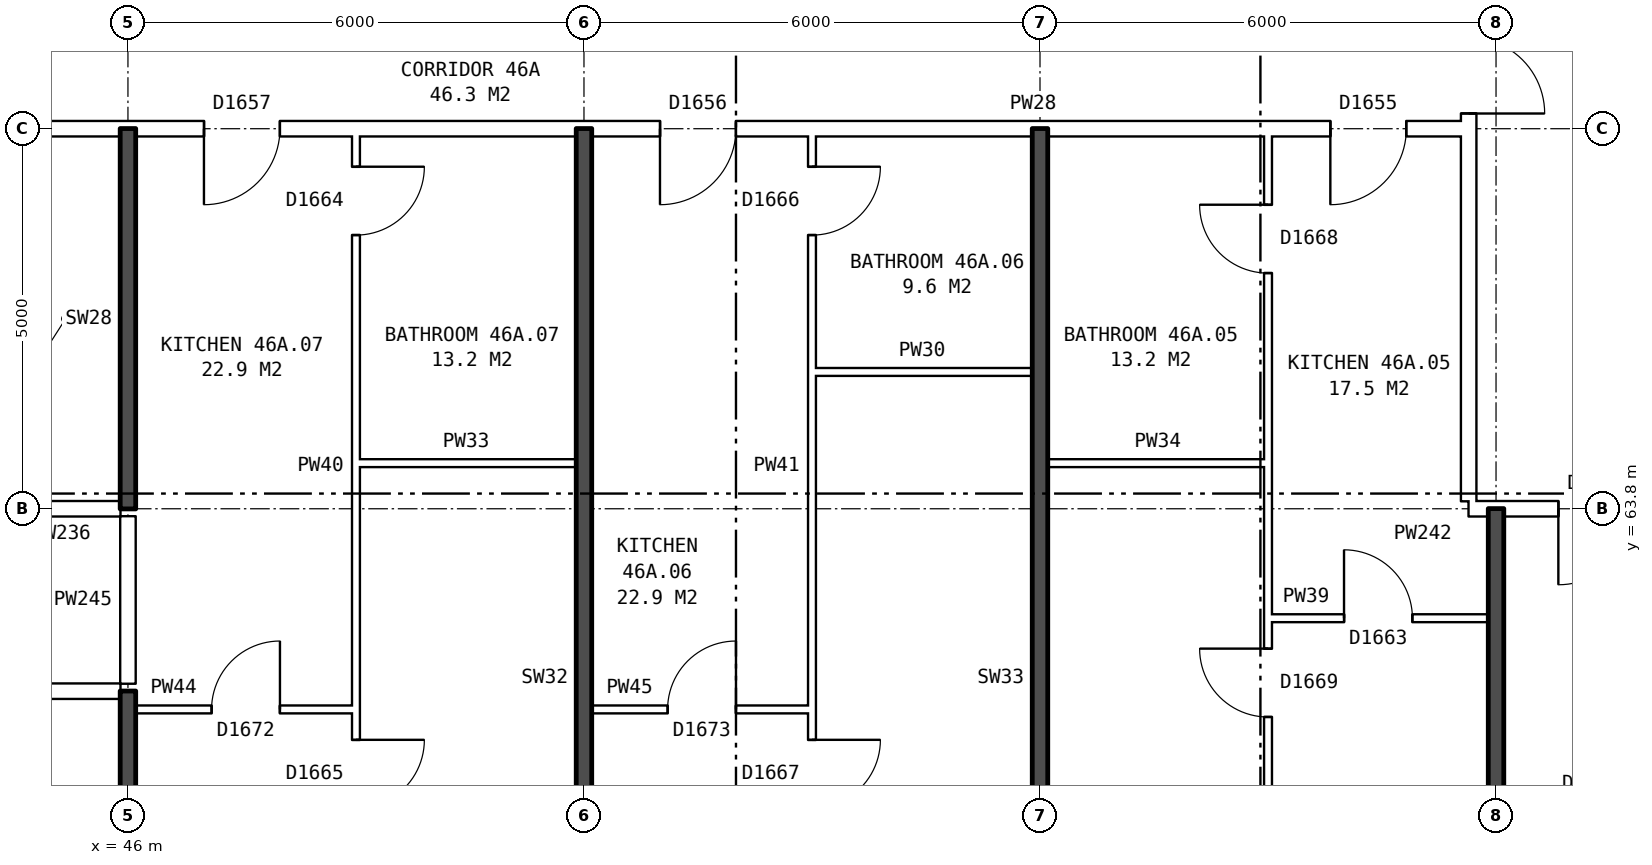
"""IFC4 building model, lengths in metres.
Left out: names, types, materials, properties, quantities, classifications, styles, units other than length and angle.
Written with IfcOpenShell. Run it as: python <this file> out.ifc"""

import sys

from ifc_helpers import new_model, si_unit, direction, frame, frame_2d, origin, place, context, subcontext, project, spatial, rectangle, extrude, element, fill, save


model = new_model("IFC4")
c1 = context("Model", 3, precision=1e-05, world=origin(), true_north=direction((0.0, 1.0)))
c2 = subcontext(c1, "Body", "Model", "MODEL_VIEW")
j1 = project(units=[si_unit("LENGTHUNIT", "METRE"), si_unit("PLANEANGLEUNIT", "RADIAN")], contexts=[c1])
p1 = place(None, origin())
s1 = spatial("IfcSite", under=j1, at=p1, CompositionType="ELEMENT")
p2 = place(p1, origin())
s2 = spatial("IfcBuilding", under=s1, at=p2, CompositionType="ELEMENT")
p3 = place(p2, frame((0.0, 0.0, 164.0)))
s3 = spatial("IfcBuildingStorey", under=s2, at=p3, CompositionType="ELEMENT", Elevation=164.0)
p4 = place(p3, frame((63.64, 63.9, 0.0), z_axis=(0.0, 0.0, 1.0), x_axis=(0.0, 1.0, 0.0)))
e1 = element("IfcWall", 1, at=p4, inside=s3, PredefinedType="PARTITIONING", context=c2, shape_type="SweptSolid", body=[
    extrude(rectangle(XDim=12.2, YDim=0.2, at=frame_2d((6.1, 0.0))), origin(), (0.0, 0.0, 1.0), 2.85),
])
p5 = place(p4, frame((5.1, 0.0, 0.0)))
e2 = element("IfcOpeningElement", 2, at=p5, cuts=e1, PredefinedType="OPENING", context=c2, shape_type="SweptSolid", body=[
    extrude(rectangle(XDim=2.0, YDim=2.1, at=frame_2d((1.0, 1.05))), frame((0.0, 0.11, 0.0), z_axis=(0.0, -1.0, 0.0), x_axis=(1.0, 0.0, 0.0)), (0.0, 0.0, 1.0), 0.22),
])
p6 = place(p3, frame((46.1, 61.16, 0.0), z_axis=(0.0, 0.0, 1.0), x_axis=(1.0, 0.0, 0.0)))
e3 = element("IfcWall", 3, at=p6, inside=s3, PredefinedType="PARTITIONING", context=c2, shape_type="SweptSolid", body=[
    extrude(rectangle(XDim=2.9, YDim=0.1, at=frame_2d((1.45, 0.0))), origin(), (0.0, 0.0, 1.0), 2.85),
])
p7 = place(p6, frame((1.0, 0.0, 0.0)))
e4 = element("IfcOpeningElement", 4, at=p7, cuts=e3, PredefinedType="OPENING", context=c2, shape_type="SweptSolid", body=[
    extrude(rectangle(XDim=0.9, YDim=2.1, at=frame_2d((0.45, 1.05))), frame((0.0, 0.06, 0.0), z_axis=(0.0, -1.0, 0.0), x_axis=(1.0, 0.0, 0.0)), (0.0, 0.0, 1.0), 0.12),
])
p8 = place(p3, frame((52.1, 61.16, 0.0), z_axis=(0.0, 0.0, 1.0), x_axis=(1.0, 0.0, 0.0)))
e5 = element("IfcWall", 5, at=p8, inside=s3, PredefinedType="PARTITIONING", context=c2, shape_type="SweptSolid", body=[
    extrude(rectangle(XDim=2.9, YDim=0.1, at=frame_2d((1.45, 0.0))), origin(), (0.0, 0.0, 1.0), 2.85),
])
p9 = place(p8, frame((1.0, 0.0, 0.0)))
e6 = element("IfcOpeningElement", 6, at=p9, cuts=e5, PredefinedType="OPENING", context=c2, shape_type="SweptSolid", body=[
    extrude(rectangle(XDim=0.9, YDim=2.1, at=frame_2d((0.45, 1.05))), frame((0.0, 0.06, 0.0), z_axis=(0.0, -1.0, 0.0), x_axis=(1.0, 0.0, 0.0)), (0.0, 0.0, 1.0), 0.12),
])
p10 = place(p3, frame((28.86, 61.4, 0.0), z_axis=(0.0, 0.0, 1.0), x_axis=(1.0, 0.0, 0.0)))
e7 = element("IfcWall", 7, at=p10, inside=s3, PredefinedType="PARTITIONING", context=c2, shape_type="SweptSolid", body=[
    extrude(rectangle(XDim=17.04, YDim=0.2, at=frame_2d((8.52, 0.0))), origin(), (0.0, 0.0, 1.0), 2.85),
])
p11 = place(p10, frame((14.59, 0.0, 0.0)))
e8 = element("IfcOpeningElement", 8, at=p11, cuts=e7, PredefinedType="OPENING", context=c2, shape_type="SweptSolid", body=[
    extrude(rectangle(XDim=1.0, YDim=2.1, at=frame_2d((0.5, 1.05))), frame((0.0, 0.11, 0.0), z_axis=(0.0, -1.0, 0.0), x_axis=(1.0, 0.0, 0.0)), (0.0, 0.0, 1.0), 0.22),
])
p12 = place(p10, frame((7.64, 0.0, 0.0)))
e9 = element("IfcOpeningElement", 9, at=p12, cuts=e7, PredefinedType="OPENING", context=c2, shape_type="SweptSolid", body=[
    extrude(rectangle(XDim=1.0, YDim=2.1, at=frame_2d((0.5, 1.05))), frame((0.0, 0.11, 0.0), z_axis=(0.0, -1.0, 0.0), x_axis=(1.0, 0.0, 0.0)), (0.0, 0.0, 1.0), 0.22),
])
p13 = place(p3, frame((61.0, 62.36, 0.0), z_axis=(0.0, 0.0, 1.0), x_axis=(1.0, 0.0, 0.0)))
e10 = element("IfcWall", 10, at=p13, inside=s3, PredefinedType="PARTITIONING", context=c2, shape_type="SweptSolid", body=[
    extrude(rectangle(XDim=2.9, YDim=0.1, at=frame_2d((1.45, 0.0))), origin(), (0.0, 0.0, 1.0), 2.85),
])
p14 = place(p13, frame((1.0, 0.0, 0.0)))
e11 = element("IfcOpeningElement", 11, at=p14, cuts=e10, PredefinedType="OPENING", context=c2, shape_type="SweptSolid", body=[
    extrude(rectangle(XDim=0.9, YDim=2.1, at=frame_2d((0.45, 1.05))), frame((0.0, 0.06, 0.0), z_axis=(0.0, -1.0, 0.0), x_axis=(1.0, 0.0, 0.0)), (0.0, 0.0, 1.0), 0.12),
])
p15 = place(p3, frame((44.36, 63.8, 0.0), z_axis=(0.0, 0.0, 1.0), x_axis=(1.0, 0.0, 0.0)))
e12 = element("IfcWall", 12, at=p15, inside=s3, PredefinedType="PARTITIONING", context=c2, shape_type="SweptSolid", body=[
    extrude(rectangle(XDim=1.54, YDim=0.2, at=frame_2d((0.77, 0.0))), origin(), (0.0, 0.0, 1.0), 2.85),
])
p16 = place(p3, frame((63.64, 63.8, 0.0), z_axis=(0.0, 0.0, 1.0), x_axis=(1.0, 0.0, 0.0)))
e13 = element("IfcWall", 13, at=p16, inside=s3, PredefinedType="PARTITIONING", context=c2, shape_type="SweptSolid", body=[
    extrude(rectangle(XDim=3.0, YDim=0.2, at=frame_2d((1.5, 0.0))), origin(), (0.0, 0.0, 1.0), 2.85),
])
p17 = place(p16, frame((1.18, 0.0, 0.0)))
e14 = element("IfcOpeningElement", 14, at=p17, cuts=e13, PredefinedType="OPENING", context=c2, shape_type="SweptSolid", body=[
    extrude(rectangle(XDim=1.0, YDim=2.1, at=frame_2d((0.5, 1.05))), frame((0.0, 0.11, 0.0), z_axis=(0.0, -1.0, 0.0), x_axis=(1.0, 0.0, 0.0)), (0.0, 0.0, 1.0), 0.22),
])
for number, where, z_axis, x_axis in (
    (15, (49.0, 64.4, 0.0), (0.0, 0.0, 1.0), (1.0, 0.0, 0.0)),
    (16, (58.1, 64.4, 0.0), (0.0, 0.0, 1.0), (1.0, 0.0, 0.0)),
    (17, (55.0, 65.6, 0.0), (0.0, 0.0, 1.0), (1.0, 0.0, 0.0)),
):
    element("IfcWall", number, at=place(p3, frame(where, z_axis=z_axis, x_axis=x_axis)), inside=s3, PredefinedType="PARTITIONING", context=c2, shape_type="SweptSolid", body=[
        extrude(rectangle(XDim=2.9, YDim=0.1, at=frame_2d((1.45, 0.0))), origin(), (0.0, 0.0, 1.0), 2.85),
    ])
p18 = place(p3, frame((44.36, 68.8, 0.0), z_axis=(0.0, 0.0, 1.0), x_axis=(1.0, 0.0, 0.0)))
e18 = element("IfcWall", 18, at=p18, inside=s3, PredefinedType="PARTITIONING", context=c2, shape_type="SweptSolid", body=[
    extrude(rectangle(XDim=19.28, YDim=0.2, at=frame_2d((9.64, 0.0))), origin(), (0.0, 0.0, 1.0), 2.85),
])
p19 = place(p18, frame((17.46, 0.0, 0.0)))
e19 = element("IfcOpeningElement", 19, at=p19, cuts=e18, PredefinedType="OPENING", context=c2, shape_type="SweptSolid", body=[
    extrude(rectangle(XDim=1.0, YDim=2.1, at=frame_2d((0.5, 1.05))), frame((0.0, 0.11, 0.0), z_axis=(0.0, -1.0, 0.0), x_axis=(1.0, 0.0, 0.0)), (0.0, 0.0, 1.0), 0.22),
])
p20 = place(p18, frame((8.64, 0.0, 0.0)))
e20 = element("IfcOpeningElement", 20, at=p20, cuts=e18, PredefinedType="OPENING", context=c2, shape_type="SweptSolid", body=[
    extrude(rectangle(XDim=1.0, YDim=2.1, at=frame_2d((0.5, 1.05))), frame((0.0, 0.11, 0.0), z_axis=(0.0, -1.0, 0.0), x_axis=(1.0, 0.0, 0.0)), (0.0, 0.0, 1.0), 0.22),
])
p21 = place(p18, frame((2.64, 0.0, 0.0)))
e21 = element("IfcOpeningElement", 21, at=p21, cuts=e18, PredefinedType="OPENING", context=c2, shape_type="SweptSolid", body=[
    extrude(rectangle(XDim=1.0, YDim=2.1, at=frame_2d((0.5, 1.05))), frame((0.0, 0.11, 0.0), z_axis=(0.0, -1.0, 0.0), x_axis=(1.0, 0.0, 0.0)), (0.0, 0.0, 1.0), 0.22),
])
p22 = place(p3, frame((46.0, 54.36, 0.0), z_axis=(0.0, 0.0, 1.0), x_axis=(0.0, 1.0, 0.0)))
e22 = element("IfcWall", 22, at=p22, inside=s3, PredefinedType="SOLIDWALL", context=c2, shape_type="SweptSolid", body=[
    extrude(rectangle(XDim=7.04, YDim=0.2, at=frame_2d((3.52, 0.0))), origin(), (0.0, 0.0, 1.0), 2.85),
])
p23 = place(p3, frame((46.0, 61.5, 0.0), z_axis=(0.0, 0.0, 1.0), x_axis=(0.0, 1.0, 0.0)))
e23 = element("IfcWall", 23, at=p23, inside=s3, PredefinedType="PARTITIONING", context=c2, shape_type="SweptSolid", body=[
    extrude(rectangle(XDim=2.2, YDim=0.2, at=frame_2d((1.1, 0.0))), origin(), (0.0, 0.0, 1.0), 2.85),
])
p24 = place(p3, frame((46.0, 63.8, 0.0), z_axis=(0.0, 0.0, 1.0), x_axis=(0.0, 1.0, 0.0)))
e24 = element("IfcWall", 24, at=p24, inside=s3, PredefinedType="SOLIDWALL", context=c2, shape_type="SweptSolid", body=[
    extrude(rectangle(XDim=5.0, YDim=0.2, at=frame_2d((2.5, 0.0))), origin(), (0.0, 0.0, 1.0), 2.85),
])
p25 = place(p3, frame((49.0, 54.36, 0.0), z_axis=(0.0, 0.0, 1.0), x_axis=(0.0, 1.0, 0.0)))
e25 = element("IfcWall", 25, at=p25, inside=s3, PredefinedType="PARTITIONING", context=c2, shape_type="SweptSolid", body=[
    extrude(rectangle(XDim=14.34, YDim=0.1, at=frame_2d((7.17, 0.0))), origin(), (0.0, 0.0, 1.0), 2.85),
])
p26 = place(p25, frame((5.5, 0.0, 0.0)))
e26 = element("IfcOpeningElement", 26, at=p26, cuts=e25, PredefinedType="OPENING", context=c2, shape_type="SweptSolid", body=[
    extrude(rectangle(XDim=0.9, YDim=2.1, at=frame_2d((0.45, 1.05))), frame((0.0, 0.06, 0.0), z_axis=(0.0, -1.0, 0.0), x_axis=(1.0, 0.0, 0.0)), (0.0, 0.0, 1.0), 0.12),
])
p27 = place(p25, frame((13.04, 0.0, 0.0)))
e27 = element("IfcOpeningElement", 27, at=p27, cuts=e25, PredefinedType="OPENING", context=c2, shape_type="SweptSolid", body=[
    extrude(rectangle(XDim=0.9, YDim=2.1, at=frame_2d((0.45, 1.05))), frame((0.0, 0.06, 0.0), z_axis=(0.0, -1.0, 0.0), x_axis=(1.0, 0.0, 0.0)), (0.0, 0.0, 1.0), 0.12),
])
p28 = place(p3, frame((52.0, 54.36, 0.0), z_axis=(0.0, 0.0, 1.0), x_axis=(0.0, 1.0, 0.0)))
e28 = element("IfcWall", 28, at=p28, inside=s3, PredefinedType="SOLIDWALL", context=c2, shape_type="SweptSolid", body=[
    extrude(rectangle(XDim=14.44, YDim=0.2, at=frame_2d((7.22, 0.0))), origin(), (0.0, 0.0, 1.0), 2.85),
])
p29 = place(p3, frame((55.0, 54.36, 0.0), z_axis=(0.0, 0.0, 1.0), x_axis=(0.0, 1.0, 0.0)))
e29 = element("IfcWall", 29, at=p29, inside=s3, PredefinedType="PARTITIONING", context=c2, shape_type="SweptSolid", body=[
    extrude(rectangle(XDim=14.34, YDim=0.1, at=frame_2d((7.17, 0.0))), origin(), (0.0, 0.0, 1.0), 2.85),
])
p30 = place(p29, frame((5.5, 0.0, 0.0)))
e30 = element("IfcOpeningElement", 30, at=p30, cuts=e29, PredefinedType="OPENING", context=c2, shape_type="SweptSolid", body=[
    extrude(rectangle(XDim=0.9, YDim=2.1, at=frame_2d((0.45, 1.05))), frame((0.0, 0.06, 0.0), z_axis=(0.0, -1.0, 0.0), x_axis=(1.0, 0.0, 0.0)), (0.0, 0.0, 1.0), 0.12),
])
p31 = place(p29, frame((13.04, 0.0, 0.0)))
e31 = element("IfcOpeningElement", 31, at=p31, cuts=e29, PredefinedType="OPENING", context=c2, shape_type="SweptSolid", body=[
    extrude(rectangle(XDim=0.9, YDim=2.1, at=frame_2d((0.45, 1.05))), frame((0.0, 0.06, 0.0), z_axis=(0.0, -1.0, 0.0), x_axis=(1.0, 0.0, 0.0)), (0.0, 0.0, 1.0), 0.12),
])
p32 = place(p3, frame((58.0, 54.36, 0.0), z_axis=(0.0, 0.0, 1.0), x_axis=(0.0, 1.0, 0.0)))
e32 = element("IfcWall", 32, at=p32, inside=s3, PredefinedType="SOLIDWALL", context=c2, shape_type="SweptSolid", body=[
    extrude(rectangle(XDim=14.44, YDim=0.2, at=frame_2d((7.22, 0.0))), origin(), (0.0, 0.0, 1.0), 2.85),
])
p33 = place(p3, frame((61.0, 54.36, 0.0), z_axis=(0.0, 0.0, 1.0), x_axis=(0.0, 1.0, 0.0)))
e33 = element("IfcWall", 33, at=p33, inside=s3, PredefinedType="PARTITIONING", context=c2, shape_type="SweptSolid", body=[
    extrude(rectangle(XDim=14.34, YDim=0.1, at=frame_2d((7.17, 0.0))), origin(), (0.0, 0.0, 1.0), 2.85),
])
p34 = place(p33, frame((6.7, 0.0, 0.0)))
e34 = element("IfcOpeningElement", 34, at=p34, cuts=e33, PredefinedType="OPENING", context=c2, shape_type="SweptSolid", body=[
    extrude(rectangle(XDim=0.9, YDim=2.1, at=frame_2d((0.45, 1.05))), frame((0.0, 0.06, 0.0), z_axis=(0.0, -1.0, 0.0), x_axis=(1.0, 0.0, 0.0)), (0.0, 0.0, 1.0), 0.12),
])
p35 = place(p33, frame((12.54, 0.0, 0.0)))
e35 = element("IfcOpeningElement", 35, at=p35, cuts=e33, PredefinedType="OPENING", context=c2, shape_type="SweptSolid", body=[
    extrude(rectangle(XDim=0.9, YDim=2.1, at=frame_2d((0.45, 1.05))), frame((0.0, 0.06, 0.0), z_axis=(0.0, -1.0, 0.0), x_axis=(1.0, 0.0, 0.0)), (0.0, 0.0, 1.0), 0.12),
])
p36 = place(p3, frame((64.0, 54.36, 0.0), z_axis=(0.0, 0.0, 1.0), x_axis=(0.0, 1.0, 0.0)))
e36 = element("IfcWall", 36, at=p36, inside=s3, PredefinedType="SOLIDWALL", context=c2, shape_type="SweptSolid", body=[
    extrude(rectangle(XDim=9.44, YDim=0.2, at=frame_2d((4.72, 0.0))), origin(), (0.0, 0.0, 1.0), 2.85),
])
p37 = place(p5, frame((2.0, 0.0, 0.0), z_axis=(0.0, 0.0, 1.0), x_axis=(-1.0, 0.0, 0.0)))
e37 = element("IfcDoor", 37, at=p37, inside=s3, OperationType="DOUBLE_DOOR_SINGLE_SWING", PredefinedType="DOOR", context=c2, shape_type="SweptSolid", body=[
    extrude(rectangle(XDim=2.0, YDim=2.1, at=frame_2d((1.0, 1.05))), frame((0.0, 0.025, 0.0), z_axis=(0.0, -1.0, 0.0), x_axis=(1.0, 0.0, 0.0)), (0.0, 0.0, 1.0), 0.05),
])
fill(e2, e37)
p38 = place(p17, frame((1.0, 0.0, 0.0), z_axis=(0.0, 0.0, 1.0), x_axis=(-1.0, 0.0, 0.0)))
e38 = element("IfcDoor", 38, at=p38, inside=s3, OperationType="SINGLE_SWING_RIGHT", PredefinedType="DOOR", context=c2, shape_type="SweptSolid", body=[
    extrude(rectangle(XDim=1.0, YDim=2.1, at=frame_2d((0.5, 1.05))), frame((0.0, 0.025, 0.0), z_axis=(0.0, -1.0, 0.0), x_axis=(1.0, 0.0, 0.0)), (0.0, 0.0, 1.0), 0.05),
])
fill(e14, e38)
p39 = place(p34, origin())
e39 = element("IfcDoor", 39, at=p39, inside=s3, OperationType="SINGLE_SWING_RIGHT", PredefinedType="DOOR", context=c2, shape_type="SweptSolid", body=[
    extrude(rectangle(XDim=0.9, YDim=2.1, at=frame_2d((0.45, 1.05))), frame((0.0, 0.025, 0.0), z_axis=(0.0, -1.0, 0.0), x_axis=(1.0, 0.0, 0.0)), (0.0, 0.0, 1.0), 0.05),
])
fill(e34, e39)
p40 = place(p19, frame((1.0, 0.0, 0.0), z_axis=(0.0, 0.0, 1.0), x_axis=(-1.0, 0.0, 0.0)))
e40 = element("IfcDoor", 40, at=p40, inside=s3, OperationType="SINGLE_SWING_RIGHT", PredefinedType="DOOR", context=c2, shape_type="SweptSolid", body=[
    extrude(rectangle(XDim=1.0, YDim=2.1, at=frame_2d((0.5, 1.05))), frame((0.0, 0.025, 0.0), z_axis=(0.0, -1.0, 0.0), x_axis=(1.0, 0.0, 0.0)), (0.0, 0.0, 1.0), 0.05),
])
fill(e19, e40)
p41 = place(p14, origin())
e41 = element("IfcDoor", 41, at=p41, inside=s3, OperationType="SINGLE_SWING_LEFT", PredefinedType="DOOR", context=c2, shape_type="SweptSolid", body=[
    extrude(rectangle(XDim=0.9, YDim=2.1, at=frame_2d((0.45, 1.05))), frame((0.0, 0.025, 0.0), z_axis=(0.0, -1.0, 0.0), x_axis=(1.0, 0.0, 0.0)), (0.0, 0.0, 1.0), 0.05),
])
fill(e11, e41)
p42 = place(p35, origin())
e42 = element("IfcDoor", 42, at=p42, inside=s3, OperationType="SINGLE_SWING_RIGHT", PredefinedType="DOOR", context=c2, shape_type="SweptSolid", body=[
    extrude(rectangle(XDim=0.9, YDim=2.1, at=frame_2d((0.45, 1.05))), frame((0.0, 0.025, 0.0), z_axis=(0.0, -1.0, 0.0), x_axis=(1.0, 0.0, 0.0)), (0.0, 0.0, 1.0), 0.05),
])
fill(e35, e42)
p43 = place(p30, frame((0.9, 0.0, 0.0), z_axis=(0.0, 0.0, 1.0), x_axis=(-1.0, 0.0, 0.0)))
e43 = element("IfcDoor", 43, at=p43, inside=s3, OperationType="SINGLE_SWING_LEFT", PredefinedType="DOOR", context=c2, shape_type="SweptSolid", body=[
    extrude(rectangle(XDim=0.9, YDim=2.1, at=frame_2d((0.45, 1.05))), frame((0.0, 0.025, 0.0), z_axis=(0.0, -1.0, 0.0), x_axis=(1.0, 0.0, 0.0)), (0.0, 0.0, 1.0), 0.05),
])
fill(e30, e43)
p44 = place(p20, frame((1.0, 0.0, 0.0), z_axis=(0.0, 0.0, 1.0), x_axis=(-1.0, 0.0, 0.0)))
e44 = element("IfcDoor", 44, at=p44, inside=s3, OperationType="SINGLE_SWING_RIGHT", PredefinedType="DOOR", context=c2, shape_type="SweptSolid", body=[
    extrude(rectangle(XDim=1.0, YDim=2.1, at=frame_2d((0.5, 1.05))), frame((0.0, 0.025, 0.0), z_axis=(0.0, -1.0, 0.0), x_axis=(1.0, 0.0, 0.0)), (0.0, 0.0, 1.0), 0.05),
])
fill(e20, e44)
p45 = place(p9, origin())
e45 = element("IfcDoor", 45, at=p45, inside=s3, OperationType="SINGLE_SWING_RIGHT", PredefinedType="DOOR", context=c2, shape_type="SweptSolid", body=[
    extrude(rectangle(XDim=0.9, YDim=2.1, at=frame_2d((0.45, 1.05))), frame((0.0, 0.025, 0.0), z_axis=(0.0, -1.0, 0.0), x_axis=(1.0, 0.0, 0.0)), (0.0, 0.0, 1.0), 0.05),
])
fill(e6, e45)
p46 = place(p31, frame((0.9, 0.0, 0.0), z_axis=(0.0, 0.0, 1.0), x_axis=(-1.0, 0.0, 0.0)))
e46 = element("IfcDoor", 46, at=p46, inside=s3, OperationType="SINGLE_SWING_LEFT", PredefinedType="DOOR", context=c2, shape_type="SweptSolid", body=[
    extrude(rectangle(XDim=0.9, YDim=2.1, at=frame_2d((0.45, 1.05))), frame((0.0, 0.025, 0.0), z_axis=(0.0, -1.0, 0.0), x_axis=(1.0, 0.0, 0.0)), (0.0, 0.0, 1.0), 0.05),
])
fill(e31, e46)
p47 = place(p26, frame((0.9, 0.0, 0.0), z_axis=(0.0, 0.0, 1.0), x_axis=(-1.0, 0.0, 0.0)))
e47 = element("IfcDoor", 47, at=p47, inside=s3, OperationType="SINGLE_SWING_LEFT", PredefinedType="DOOR", context=c2, shape_type="SweptSolid", body=[
    extrude(rectangle(XDim=0.9, YDim=2.1, at=frame_2d((0.45, 1.05))), frame((0.0, 0.025, 0.0), z_axis=(0.0, -1.0, 0.0), x_axis=(1.0, 0.0, 0.0)), (0.0, 0.0, 1.0), 0.05),
])
fill(e26, e47)
p48 = place(p21, frame((1.0, 0.0, 0.0), z_axis=(0.0, 0.0, 1.0), x_axis=(-1.0, 0.0, 0.0)))
e48 = element("IfcDoor", 48, at=p48, inside=s3, OperationType="SINGLE_SWING_RIGHT", PredefinedType="DOOR", context=c2, shape_type="SweptSolid", body=[
    extrude(rectangle(XDim=1.0, YDim=2.1, at=frame_2d((0.5, 1.05))), frame((0.0, 0.025, 0.0), z_axis=(0.0, -1.0, 0.0), x_axis=(1.0, 0.0, 0.0)), (0.0, 0.0, 1.0), 0.05),
])
fill(e21, e48)
p49 = place(p7, origin())
e49 = element("IfcDoor", 49, at=p49, inside=s3, OperationType="SINGLE_SWING_RIGHT", PredefinedType="DOOR", context=c2, shape_type="SweptSolid", body=[
    extrude(rectangle(XDim=0.9, YDim=2.1, at=frame_2d((0.45, 1.05))), frame((0.0, 0.025, 0.0), z_axis=(0.0, -1.0, 0.0), x_axis=(1.0, 0.0, 0.0)), (0.0, 0.0, 1.0), 0.05),
])
fill(e4, e49)
p50 = place(p27, frame((0.9, 0.0, 0.0), z_axis=(0.0, 0.0, 1.0), x_axis=(-1.0, 0.0, 0.0)))
e50 = element("IfcDoor", 50, at=p50, inside=s3, OperationType="SINGLE_SWING_LEFT", PredefinedType="DOOR", context=c2, shape_type="SweptSolid", body=[
    extrude(rectangle(XDim=0.9, YDim=2.1, at=frame_2d((0.45, 1.05))), frame((0.0, 0.025, 0.0), z_axis=(0.0, -1.0, 0.0), x_axis=(1.0, 0.0, 0.0)), (0.0, 0.0, 1.0), 0.05),
])
fill(e27, e50)
save(model, sys.argv[1])
